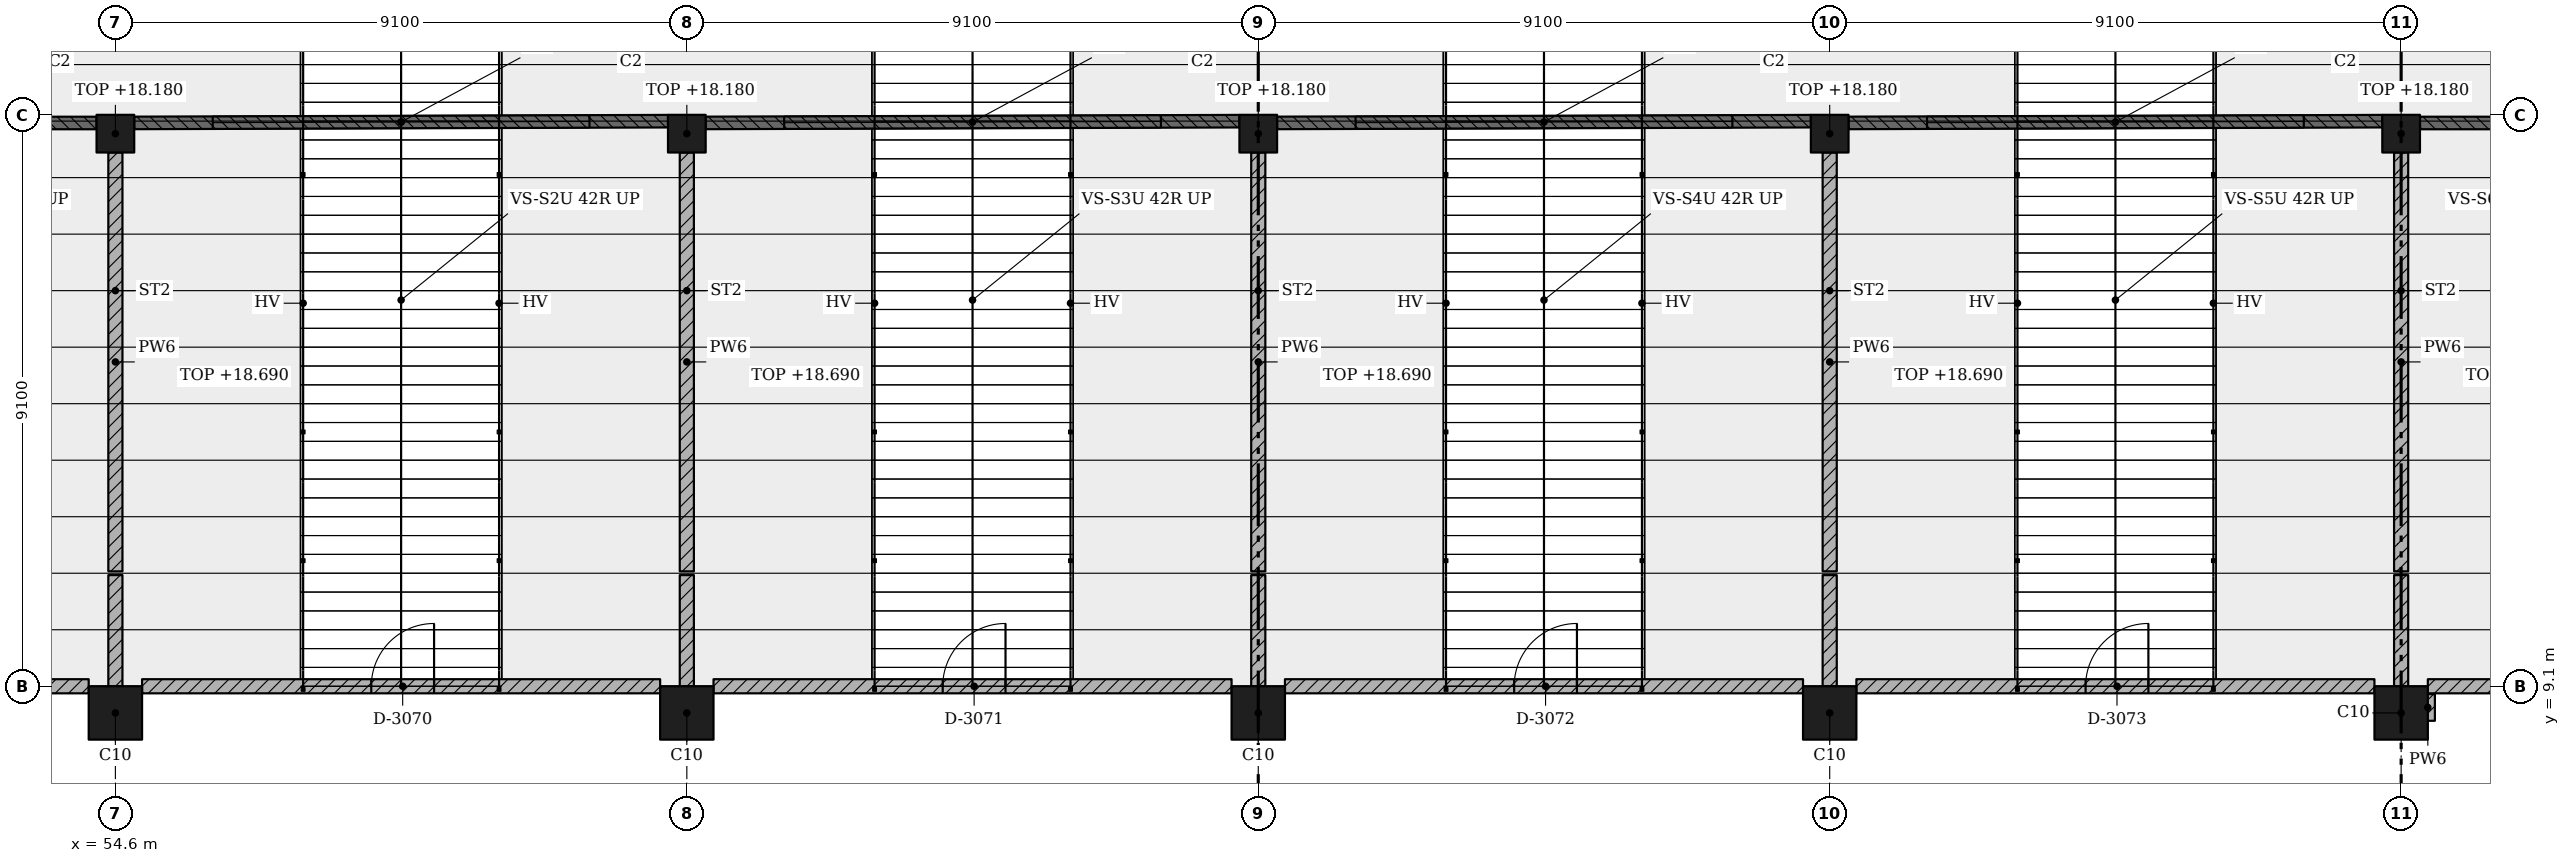
"""IFC4 building model, lengths in metres.
Left out: names, types, materials, properties, quantities, classifications, styles, units other than length and angle.
Written with IfcOpenShell. Run it as: python <this file> out.ifc"""

import sys

from ifc_helpers import new_model, si_unit, direction, frame, frame_2d, origin, origin_2d, place, context, subcontext, project, spatial, rectangle, extrude, element, fill, save


model = new_model("IFC4")
c1 = context("Model", 3, precision=1e-05, world=origin(), true_north=direction((0.0, 1.0)))
c2 = subcontext(c1, "Body", "Model", "MODEL_VIEW")
j1 = project(units=[si_unit("LENGTHUNIT", "METRE"), si_unit("PLANEANGLEUNIT", "RADIAN")], contexts=[c1])
p1 = place(None, origin())
s1 = spatial("IfcSite", under=j1, at=p1, CompositionType="ELEMENT")
p2 = place(p1, origin())
s2 = spatial("IfcBuilding", under=s1, at=p2, CompositionType="ELEMENT")
p3 = place(p2, frame((0.0, 0.0, 15.47)))
s3 = spatial("IfcBuildingStorey", under=s2, at=p3, CompositionType="ELEMENT", Elevation=15.47)
p4 = place(p3, frame((54.6, 8.675, 0.0), z_axis=(0.0, 0.0, 1.0), x_axis=(1.0, 0.0, 0.0)))
e1 = element("IfcColumn", 1, at=p4, inside=s3, PredefinedType="COLUMN", context=c2, shape_type="SweptSolid", body=[
    extrude(rectangle(XDim=0.85, YDim=0.85, at=origin_2d()), origin(), (0.0, 0.0, 1.0), 4.55),
])
p5 = place(p3, frame((54.6, 17.9, 0.0), z_axis=(0.0, 0.0, 1.0), x_axis=(1.0, 0.0, 0.0)))
e2 = element("IfcColumn", 2, at=p5, inside=s3, PredefinedType="COLUMN", context=c2, shape_type="SweptSolid", body=[
    extrude(rectangle(XDim=0.6, YDim=0.6, at=origin_2d()), origin(), (0.0, 0.0, 1.0), 2.71),
])
p6 = place(p3, frame((63.7, 8.675, 0.0), z_axis=(0.0, 0.0, 1.0), x_axis=(1.0, 0.0, 0.0)))
e3 = element("IfcColumn", 3, at=p6, inside=s3, PredefinedType="COLUMN", context=c2, shape_type="SweptSolid", body=[
    extrude(rectangle(XDim=0.85, YDim=0.85, at=origin_2d()), origin(), (0.0, 0.0, 1.0), 4.55),
])
p7 = place(p3, frame((63.7, 17.9, 0.0), z_axis=(0.0, 0.0, 1.0), x_axis=(1.0, 0.0, 0.0)))
e4 = element("IfcColumn", 4, at=p7, inside=s3, PredefinedType="COLUMN", context=c2, shape_type="SweptSolid", body=[
    extrude(rectangle(XDim=0.6, YDim=0.6, at=origin_2d()), origin(), (0.0, 0.0, 1.0), 2.71),
])
p8 = place(p3, frame((72.8, 8.675, 0.0), z_axis=(0.0, 0.0, 1.0), x_axis=(1.0, 0.0, 0.0)))
e5 = element("IfcColumn", 5, at=p8, inside=s3, PredefinedType="COLUMN", context=c2, shape_type="SweptSolid", body=[
    extrude(rectangle(XDim=0.85, YDim=0.85, at=origin_2d()), origin(), (0.0, 0.0, 1.0), 4.55),
])
p9 = place(p3, frame((72.8, 17.9, 0.0), z_axis=(0.0, 0.0, 1.0), x_axis=(1.0, 0.0, 0.0)))
e6 = element("IfcColumn", 6, at=p9, inside=s3, PredefinedType="COLUMN", context=c2, shape_type="SweptSolid", body=[
    extrude(rectangle(XDim=0.6, YDim=0.6, at=origin_2d()), origin(), (0.0, 0.0, 1.0), 2.71),
])
p10 = place(p3, frame((81.9, 8.675, 0.0), z_axis=(0.0, 0.0, 1.0), x_axis=(1.0, 0.0, 0.0)))
e7 = element("IfcColumn", 7, at=p10, inside=s3, PredefinedType="COLUMN", context=c2, shape_type="SweptSolid", body=[
    extrude(rectangle(XDim=0.85, YDim=0.85, at=origin_2d()), origin(), (0.0, 0.0, 1.0), 4.55),
])
p11 = place(p3, frame((81.9, 17.9, 0.0), z_axis=(0.0, 0.0, 1.0), x_axis=(1.0, 0.0, 0.0)))
e8 = element("IfcColumn", 8, at=p11, inside=s3, PredefinedType="COLUMN", context=c2, shape_type="SweptSolid", body=[
    extrude(rectangle(XDim=0.6, YDim=0.6, at=origin_2d()), origin(), (0.0, 0.0, 1.0), 2.71),
])
p12 = place(p3, frame((91.0, 8.675, 0.0), z_axis=(0.0, 0.0, 1.0), x_axis=(1.0, 0.0, 0.0)))
e9 = element("IfcColumn", 9, at=p12, inside=s3, PredefinedType="COLUMN", context=c2, shape_type="SweptSolid", body=[
    extrude(rectangle(XDim=0.85, YDim=0.85, at=origin_2d()), origin(), (0.0, 0.0, 1.0), 4.55),
])
p13 = place(p3, frame((91.0, 17.9, 0.0), z_axis=(0.0, 0.0, 1.0), x_axis=(1.0, 0.0, 0.0)))
e10 = element("IfcColumn", 10, at=p13, inside=s3, PredefinedType="COLUMN", context=c2, shape_type="SweptSolid", body=[
    extrude(rectangle(XDim=0.6, YDim=0.6, at=origin_2d()), origin(), (0.0, 0.0, 1.0), 2.71),
])
p14 = place(p3, frame((45.925, 9.1, 0.0), z_axis=(0.0, 0.0, 1.0), x_axis=(1.0, 0.0, 0.0)))
e11 = element("IfcWall", 11, at=p14, inside=s3, PredefinedType="PARTITIONING", context=c2, shape_type="SweptSolid", body=[
    extrude(rectangle(XDim=8.25, YDim=0.225, at=frame_2d((4.125, 0.0))), origin(), (0.0, 0.0, 1.0), 3.6),
])
p15 = place(p14, frame((3.65, 0.0, 0.0)))
e12 = element("IfcOpeningElement", 12, at=p15, cuts=e11, PredefinedType="OPENING", context=c2, shape_type="SweptSolid", body=[
    extrude(rectangle(XDim=1.0, YDim=2.4, at=frame_2d((0.5, 1.2))), frame((0.0, 0.123, 0.0), z_axis=(0.0, -1.0, 0.0), x_axis=(1.0, 0.0, 0.0)), (0.0, 0.0, 1.0), 0.245),
])
p16 = place(p3, frame((54.6, 10.87, 0.0), z_axis=(0.0, 0.0, 1.0), x_axis=(0.0, -1.0, 0.0)))
e13 = element("IfcWall", 13, at=p16, inside=s3, PredefinedType="PARTITIONING", context=c2, shape_type="SweptSolid", body=[
    extrude(rectangle(XDim=1.77, YDim=0.225, at=frame_2d((0.885, 0.0))), origin(), (0.0, 0.0, 1.0), 3.22),
])
p17 = place(p3, frame((54.6, 17.6, 0.0), z_axis=(0.0, 0.0, 1.0), x_axis=(0.0, -1.0, 0.0)))
e14 = element("IfcWall", 14, at=p17, inside=s3, PredefinedType="PARTITIONING", context=c2, shape_type="SweptSolid", body=[
    extrude(rectangle(XDim=6.67, YDim=0.225, at=frame_2d((3.335, 0.0))), origin(), (0.0, 0.0, 1.0), 3.22),
])
p18 = place(p3, frame((55.025, 9.1, 0.0), z_axis=(0.0, 0.0, 1.0), x_axis=(1.0, 0.0, 0.0)))
e15 = element("IfcWall", 15, at=p18, inside=s3, PredefinedType="PARTITIONING", context=c2, shape_type="SweptSolid", body=[
    extrude(rectangle(XDim=8.25, YDim=0.225, at=frame_2d((4.125, 0.0))), origin(), (0.0, 0.0, 1.0), 3.6),
])
p19 = place(p18, frame((3.65, 0.0, 0.0)))
e16 = element("IfcOpeningElement", 16, at=p19, cuts=e15, PredefinedType="OPENING", context=c2, shape_type="SweptSolid", body=[
    extrude(rectangle(XDim=1.0, YDim=2.4, at=frame_2d((0.5, 1.2))), frame((0.0, 0.123, 0.0), z_axis=(0.0, -1.0, 0.0), x_axis=(1.0, 0.0, 0.0)), (0.0, 0.0, 1.0), 0.245),
])
p20 = place(p3, frame((63.7, 10.87, 0.0), z_axis=(0.0, 0.0, 1.0), x_axis=(0.0, -1.0, 0.0)))
e17 = element("IfcWall", 17, at=p20, inside=s3, PredefinedType="PARTITIONING", context=c2, shape_type="SweptSolid", body=[
    extrude(rectangle(XDim=1.77, YDim=0.225, at=frame_2d((0.885, 0.0))), origin(), (0.0, 0.0, 1.0), 3.22),
])
p21 = place(p3, frame((63.7, 17.6, 0.0), z_axis=(0.0, 0.0, 1.0), x_axis=(0.0, -1.0, 0.0)))
e18 = element("IfcWall", 18, at=p21, inside=s3, PredefinedType="PARTITIONING", context=c2, shape_type="SweptSolid", body=[
    extrude(rectangle(XDim=6.67, YDim=0.225, at=frame_2d((3.335, 0.0))), origin(), (0.0, 0.0, 1.0), 3.22),
])
p22 = place(p3, frame((64.125, 9.1, 0.0), z_axis=(0.0, 0.0, 1.0), x_axis=(1.0, 0.0, 0.0)))
e19 = element("IfcWall", 19, at=p22, inside=s3, PredefinedType="PARTITIONING", context=c2, shape_type="SweptSolid", body=[
    extrude(rectangle(XDim=8.25, YDim=0.225, at=frame_2d((4.125, 0.0))), origin(), (0.0, 0.0, 1.0), 3.6),
])
p23 = place(p22, frame((3.65, 0.0, 0.0)))
e20 = element("IfcOpeningElement", 20, at=p23, cuts=e19, PredefinedType="OPENING", context=c2, shape_type="SweptSolid", body=[
    extrude(rectangle(XDim=1.0, YDim=2.4, at=frame_2d((0.5, 1.2))), frame((0.0, 0.123, 0.0), z_axis=(0.0, -1.0, 0.0), x_axis=(1.0, 0.0, 0.0)), (0.0, 0.0, 1.0), 0.245),
])
p24 = place(p3, frame((72.8, 10.87, 0.0), z_axis=(0.0, 0.0, 1.0), x_axis=(0.0, -1.0, 0.0)))
e21 = element("IfcWall", 21, at=p24, inside=s3, PredefinedType="PARTITIONING", context=c2, shape_type="SweptSolid", body=[
    extrude(rectangle(XDim=1.77, YDim=0.225, at=frame_2d((0.885, 0.0))), origin(), (0.0, 0.0, 1.0), 3.22),
])
p25 = place(p3, frame((72.8, 17.6, 0.0), z_axis=(0.0, 0.0, 1.0), x_axis=(0.0, -1.0, 0.0)))
e22 = element("IfcWall", 22, at=p25, inside=s3, PredefinedType="PARTITIONING", context=c2, shape_type="SweptSolid", body=[
    extrude(rectangle(XDim=6.67, YDim=0.225, at=frame_2d((3.335, 0.0))), origin(), (0.0, 0.0, 1.0), 3.22),
])
p26 = place(p3, frame((73.225, 9.1, 0.0), z_axis=(0.0, 0.0, 1.0), x_axis=(1.0, 0.0, 0.0)))
e23 = element("IfcWall", 23, at=p26, inside=s3, PredefinedType="PARTITIONING", context=c2, shape_type="SweptSolid", body=[
    extrude(rectangle(XDim=8.25, YDim=0.225, at=frame_2d((4.125, 0.0))), origin(), (0.0, 0.0, 1.0), 3.6),
])
p27 = place(p26, frame((3.65, 0.0, 0.0)))
e24 = element("IfcOpeningElement", 24, at=p27, cuts=e23, PredefinedType="OPENING", context=c2, shape_type="SweptSolid", body=[
    extrude(rectangle(XDim=1.0, YDim=2.4, at=frame_2d((0.5, 1.2))), frame((0.0, 0.123, 0.0), z_axis=(0.0, -1.0, 0.0), x_axis=(1.0, 0.0, 0.0)), (0.0, 0.0, 1.0), 0.245),
])
p28 = place(p3, frame((81.9, 10.87, 0.0), z_axis=(0.0, 0.0, 1.0), x_axis=(0.0, -1.0, 0.0)))
e25 = element("IfcWall", 25, at=p28, inside=s3, PredefinedType="PARTITIONING", context=c2, shape_type="SweptSolid", body=[
    extrude(rectangle(XDim=1.77, YDim=0.225, at=frame_2d((0.885, 0.0))), origin(), (0.0, 0.0, 1.0), 3.22),
])
p29 = place(p3, frame((81.9, 17.6, 0.0), z_axis=(0.0, 0.0, 1.0), x_axis=(0.0, -1.0, 0.0)))
e26 = element("IfcWall", 26, at=p29, inside=s3, PredefinedType="PARTITIONING", context=c2, shape_type="SweptSolid", body=[
    extrude(rectangle(XDim=6.67, YDim=0.225, at=frame_2d((3.335, 0.0))), origin(), (0.0, 0.0, 1.0), 3.22),
])
p30 = place(p3, frame((82.325, 9.1, 0.0), z_axis=(0.0, 0.0, 1.0), x_axis=(1.0, 0.0, 0.0)))
e27 = element("IfcWall", 27, at=p30, inside=s3, PredefinedType="PARTITIONING", context=c2, shape_type="SweptSolid", body=[
    extrude(rectangle(XDim=8.25, YDim=0.225, at=frame_2d((4.125, 0.0))), origin(), (0.0, 0.0, 1.0), 3.6),
])
p31 = place(p30, frame((3.65, 0.0, 0.0)))
e28 = element("IfcOpeningElement", 28, at=p31, cuts=e27, PredefinedType="OPENING", context=c2, shape_type="SweptSolid", body=[
    extrude(rectangle(XDim=1.0, YDim=2.4, at=frame_2d((0.5, 1.2))), frame((0.0, 0.123, 0.0), z_axis=(0.0, -1.0, 0.0), x_axis=(1.0, 0.0, 0.0)), (0.0, 0.0, 1.0), 0.245),
])
p32 = place(p3, frame((91.0, 10.87, 0.0), z_axis=(0.0, 0.0, 1.0), x_axis=(0.0, -1.0, 0.0)))
e29 = element("IfcWall", 29, at=p32, inside=s3, PredefinedType="PARTITIONING", context=c2, shape_type="SweptSolid", body=[
    extrude(rectangle(XDim=1.77, YDim=0.225, at=frame_2d((0.885, 0.0))), origin(), (0.0, 0.0, 1.0), 3.22),
])
p33 = place(p3, frame((91.0, 17.6, 0.0), z_axis=(0.0, 0.0, 1.0), x_axis=(0.0, -1.0, 0.0)))
e30 = element("IfcWall", 30, at=p33, inside=s3, PredefinedType="PARTITIONING", context=c2, shape_type="SweptSolid", body=[
    extrude(rectangle(XDim=6.67, YDim=0.225, at=frame_2d((3.335, 0.0))), origin(), (0.0, 0.0, 1.0), 3.22),
])
p34 = place(p3, frame((91.425, 8.55, 0.0), z_axis=(0.0, 0.0, 1.0), x_axis=(0.0, 1.0, 0.0)))
e31 = element("IfcWall", 31, at=p34, inside=s3, PredefinedType="PARTITIONING", context=c2, shape_type="SweptSolid", body=[
    extrude(rectangle(XDim=0.425, YDim=0.225, at=frame_2d((0.212, 0.0))), origin(), (0.0, 0.0, 1.0), 4.3),
])
p35 = place(p3, frame((91.425, 9.1, 0.0), z_axis=(0.0, 0.0, 1.0), x_axis=(1.0, 0.0, 0.0)))
e32 = element("IfcWall", 32, at=p35, inside=s3, PredefinedType="PARTITIONING", context=c2, shape_type="SweptSolid", body=[
    extrude(rectangle(XDim=8.25, YDim=0.225, at=frame_2d((4.125, 0.0))), origin(), (0.0, 0.0, 1.0), 3.6),
])
p36 = place(p35, frame((3.65, 0.0, 0.0)))
e33 = element("IfcOpeningElement", 33, at=p36, cuts=e32, PredefinedType="OPENING", context=c2, shape_type="SweptSolid", body=[
    extrude(rectangle(XDim=1.0, YDim=2.4, at=frame_2d((0.5, 1.2))), frame((0.0, 0.123, 0.0), z_axis=(0.0, -1.0, 0.0), x_axis=(1.0, 0.0, 0.0)), (0.0, 0.0, 1.0), 0.245),
])
p37 = place(p3, frame((45.8, 18.07, 0.0), z_axis=(0.0, 0.0, 1.0), x_axis=(1.0, 0.0, 0.0)))
e34 = element("IfcWall", 34, at=p37, inside=s3, PredefinedType="PARTITIONING", context=c2, shape_type="SweptSolid", body=[
    extrude(rectangle(XDim=8.5, YDim=0.2, at=frame_2d((4.25, 0.0))), origin(), (0.0, 0.0, 1.0), 2.71),
])
p38 = place(p37, frame((1.25, 0.0, 1.1)))
e35 = element("IfcOpeningElement", 35, at=p38, cuts=e34, PredefinedType="OPENING", context=c2, shape_type="SweptSolid", body=[
    extrude(rectangle(XDim=6.0, YDim=1.3, at=frame_2d((3.0, 0.65))), frame((0.0, 0.11, 0.0), z_axis=(0.0, -1.0, 0.0), x_axis=(1.0, 0.0, 0.0)), (0.0, 0.0, 1.0), 0.22),
])
p39 = place(p3, frame((54.9, 18.071, 0.0), z_axis=(0.0, 0.0, 1.0), x_axis=(0.999994544879, 0.003303061025, 0.0)))
e36 = element("IfcWall", 36, at=p39, inside=s3, PredefinedType="PARTITIONING", context=c2, shape_type="SweptSolid", body=[
    extrude(rectangle(XDim=8.5, YDim=0.2, at=frame_2d((4.25, 0.0))), origin(), (0.0, 0.0, 1.0), 2.71),
])
p40 = place(p39, frame((1.25, 0.0, 1.1)))
e37 = element("IfcOpeningElement", 37, at=p40, cuts=e36, PredefinedType="OPENING", context=c2, shape_type="SweptSolid", body=[
    extrude(rectangle(XDim=6.0, YDim=1.3, at=frame_2d((3.0, 0.65))), frame((0.0, 0.11, 0.0), z_axis=(0.0, -1.0, 0.0), x_axis=(1.0, 0.0, 0.0)), (0.0, 0.0, 1.0), 0.22),
])
p41 = place(p3, frame((64.0, 18.071, 0.0), z_axis=(0.0, 0.0, 1.0), x_axis=(0.999994544879, 0.003303061025, 0.0)))
e38 = element("IfcWall", 38, at=p41, inside=s3, PredefinedType="PARTITIONING", context=c2, shape_type="SweptSolid", body=[
    extrude(rectangle(XDim=8.5, YDim=0.2, at=frame_2d((4.25, 0.0))), origin(), (0.0, 0.0, 1.0), 2.71),
])
p42 = place(p41, frame((1.25, 0.0, 1.1)))
e39 = element("IfcOpeningElement", 39, at=p42, cuts=e38, PredefinedType="OPENING", context=c2, shape_type="SweptSolid", body=[
    extrude(rectangle(XDim=6.0, YDim=1.3, at=frame_2d((3.0, 0.65))), frame((0.0, 0.11, 0.0), z_axis=(0.0, -1.0, 0.0), x_axis=(1.0, 0.0, 0.0)), (0.0, 0.0, 1.0), 0.22),
])
p43 = place(p3, frame((73.1, 18.071, 0.0), z_axis=(0.0, 0.0, 1.0), x_axis=(0.999994544879, 0.003303061025, 0.0)))
e40 = element("IfcWall", 40, at=p43, inside=s3, PredefinedType="PARTITIONING", context=c2, shape_type="SweptSolid", body=[
    extrude(rectangle(XDim=8.5, YDim=0.2, at=frame_2d((4.25, 0.0))), origin(), (0.0, 0.0, 1.0), 2.71),
])
p44 = place(p43, frame((1.25, 0.0, 1.1)))
e41 = element("IfcOpeningElement", 41, at=p44, cuts=e40, PredefinedType="OPENING", context=c2, shape_type="SweptSolid", body=[
    extrude(rectangle(XDim=6.0, YDim=1.3, at=frame_2d((3.0, 0.65))), frame((0.0, 0.11, 0.0), z_axis=(0.0, -1.0, 0.0), x_axis=(1.0, 0.0, 0.0)), (0.0, 0.0, 1.0), 0.22),
])
p45 = place(p3, frame((82.2, 18.071, 0.0), z_axis=(0.0, 0.0, 1.0), x_axis=(0.999994544879, 0.003303061025, 0.0)))
e42 = element("IfcWall", 42, at=p45, inside=s3, PredefinedType="PARTITIONING", context=c2, shape_type="SweptSolid", body=[
    extrude(rectangle(XDim=8.5, YDim=0.2, at=frame_2d((4.25, 0.0))), origin(), (0.0, 0.0, 1.0), 2.71),
])
p46 = place(p45, frame((1.25, 0.0, 1.1)))
e43 = element("IfcOpeningElement", 43, at=p46, cuts=e42, PredefinedType="OPENING", context=c2, shape_type="SweptSolid", body=[
    extrude(rectangle(XDim=6.0, YDim=1.3, at=frame_2d((3.0, 0.65))), frame((0.0, 0.11, 0.0), z_axis=(0.0, -1.0, 0.0), x_axis=(1.0, 0.0, 0.0)), (0.0, 0.0, 1.0), 0.22),
])
p47 = place(p3, frame((91.3, 18.07, 0.0), z_axis=(0.0, 0.0, 1.0), x_axis=(1.0, 0.0, 0.0)))
e44 = element("IfcWall", 44, at=p47, inside=s3, PredefinedType="PARTITIONING", context=c2, shape_type="SweptSolid", body=[
    extrude(rectangle(XDim=8.5, YDim=0.2, at=frame_2d((4.25, 0.0))), origin(), (0.0, 0.0, 1.0), 2.71),
])
p48 = place(p47, frame((1.25, 0.0, 1.1)))
e45 = element("IfcOpeningElement", 45, at=p48, cuts=e44, PredefinedType="OPENING", context=c2, shape_type="SweptSolid", body=[
    extrude(rectangle(XDim=6.0, YDim=1.3, at=frame_2d((3.0, 0.65))), frame((0.0, 0.11, 0.0), z_axis=(0.0, -1.0, 0.0), x_axis=(1.0, 0.0, 0.0)), (0.0, 0.0, 1.0), 0.22),
])
p49 = place(p40, origin())
e46 = element("IfcWindow", 46, at=p49, inside=s3, PartitioningType="SINGLE_PANEL", PredefinedType="WINDOW", context=c2, shape_type="SweptSolid", body=[
    extrude(rectangle(XDim=6.0, YDim=1.3, at=frame_2d((3.0, 0.65))), frame((0.0, 0.03, 0.0), z_axis=(0.0, -1.0, 0.0), x_axis=(1.0, 0.0, 0.0)), (0.0, 0.0, 1.0), 0.06),
])
fill(e37, e46)
p50 = place(p42, origin())
e47 = element("IfcWindow", 47, at=p50, inside=s3, PartitioningType="SINGLE_PANEL", PredefinedType="WINDOW", context=c2, shape_type="SweptSolid", body=[
    extrude(rectangle(XDim=6.0, YDim=1.3, at=frame_2d((3.0, 0.65))), frame((0.0, 0.03, 0.0), z_axis=(0.0, -1.0, 0.0), x_axis=(1.0, 0.0, 0.0)), (0.0, 0.0, 1.0), 0.06),
])
fill(e39, e47)
p51 = place(p44, origin())
e48 = element("IfcWindow", 48, at=p51, inside=s3, PartitioningType="SINGLE_PANEL", PredefinedType="WINDOW", context=c2, shape_type="SweptSolid", body=[
    extrude(rectangle(XDim=6.0, YDim=1.3, at=frame_2d((3.0, 0.65))), frame((0.0, 0.03, 0.0), z_axis=(0.0, -1.0, 0.0), x_axis=(1.0, 0.0, 0.0)), (0.0, 0.0, 1.0), 0.06),
])
fill(e41, e48)
p52 = place(p46, origin())
e49 = element("IfcWindow", 49, at=p52, inside=s3, PartitioningType="SINGLE_PANEL", PredefinedType="WINDOW", context=c2, shape_type="SweptSolid", body=[
    extrude(rectangle(XDim=6.0, YDim=1.3, at=frame_2d((3.0, 0.65))), frame((0.0, 0.03, 0.0), z_axis=(0.0, -1.0, 0.0), x_axis=(1.0, 0.0, 0.0)), (0.0, 0.0, 1.0), 0.06),
])
fill(e43, e49)
p53 = place(p19, origin())
e50 = element("IfcDoor", 50, at=p53, inside=s3, OperationType="SINGLE_SWING_LEFT", PredefinedType="DOOR", context=c2, shape_type="SweptSolid", body=[
    extrude(rectangle(XDim=1.0, YDim=2.4, at=frame_2d((0.5, 1.2))), frame((0.0, 0.025, 0.0), z_axis=(0.0, -1.0, 0.0), x_axis=(1.0, 0.0, 0.0)), (0.0, 0.0, 1.0), 0.05),
])
fill(e16, e50)
p54 = place(p23, origin())
e51 = element("IfcDoor", 51, at=p54, inside=s3, OperationType="SINGLE_SWING_LEFT", PredefinedType="DOOR", context=c2, shape_type="SweptSolid", body=[
    extrude(rectangle(XDim=1.0, YDim=2.4, at=frame_2d((0.5, 1.2))), frame((0.0, 0.025, 0.0), z_axis=(0.0, -1.0, 0.0), x_axis=(1.0, 0.0, 0.0)), (0.0, 0.0, 1.0), 0.05),
])
fill(e20, e51)
p55 = place(p27, origin())
e52 = element("IfcDoor", 52, at=p55, inside=s3, OperationType="SINGLE_SWING_LEFT", PredefinedType="DOOR", context=c2, shape_type="SweptSolid", body=[
    extrude(rectangle(XDim=1.0, YDim=2.4, at=frame_2d((0.5, 1.2))), frame((0.0, 0.025, 0.0), z_axis=(0.0, -1.0, 0.0), x_axis=(1.0, 0.0, 0.0)), (0.0, 0.0, 1.0), 0.05),
])
fill(e24, e52)
p56 = place(p31, origin())
e53 = element("IfcDoor", 53, at=p56, inside=s3, OperationType="SINGLE_SWING_LEFT", PredefinedType="DOOR", context=c2, shape_type="SweptSolid", body=[
    extrude(rectangle(XDim=1.0, YDim=2.4, at=frame_2d((0.5, 1.2))), frame((0.0, 0.025, 0.0), z_axis=(0.0, -1.0, 0.0), x_axis=(1.0, 0.0, 0.0)), (0.0, 0.0, 1.0), 0.05),
])
fill(e28, e53)
save(model, sys.argv[1])
